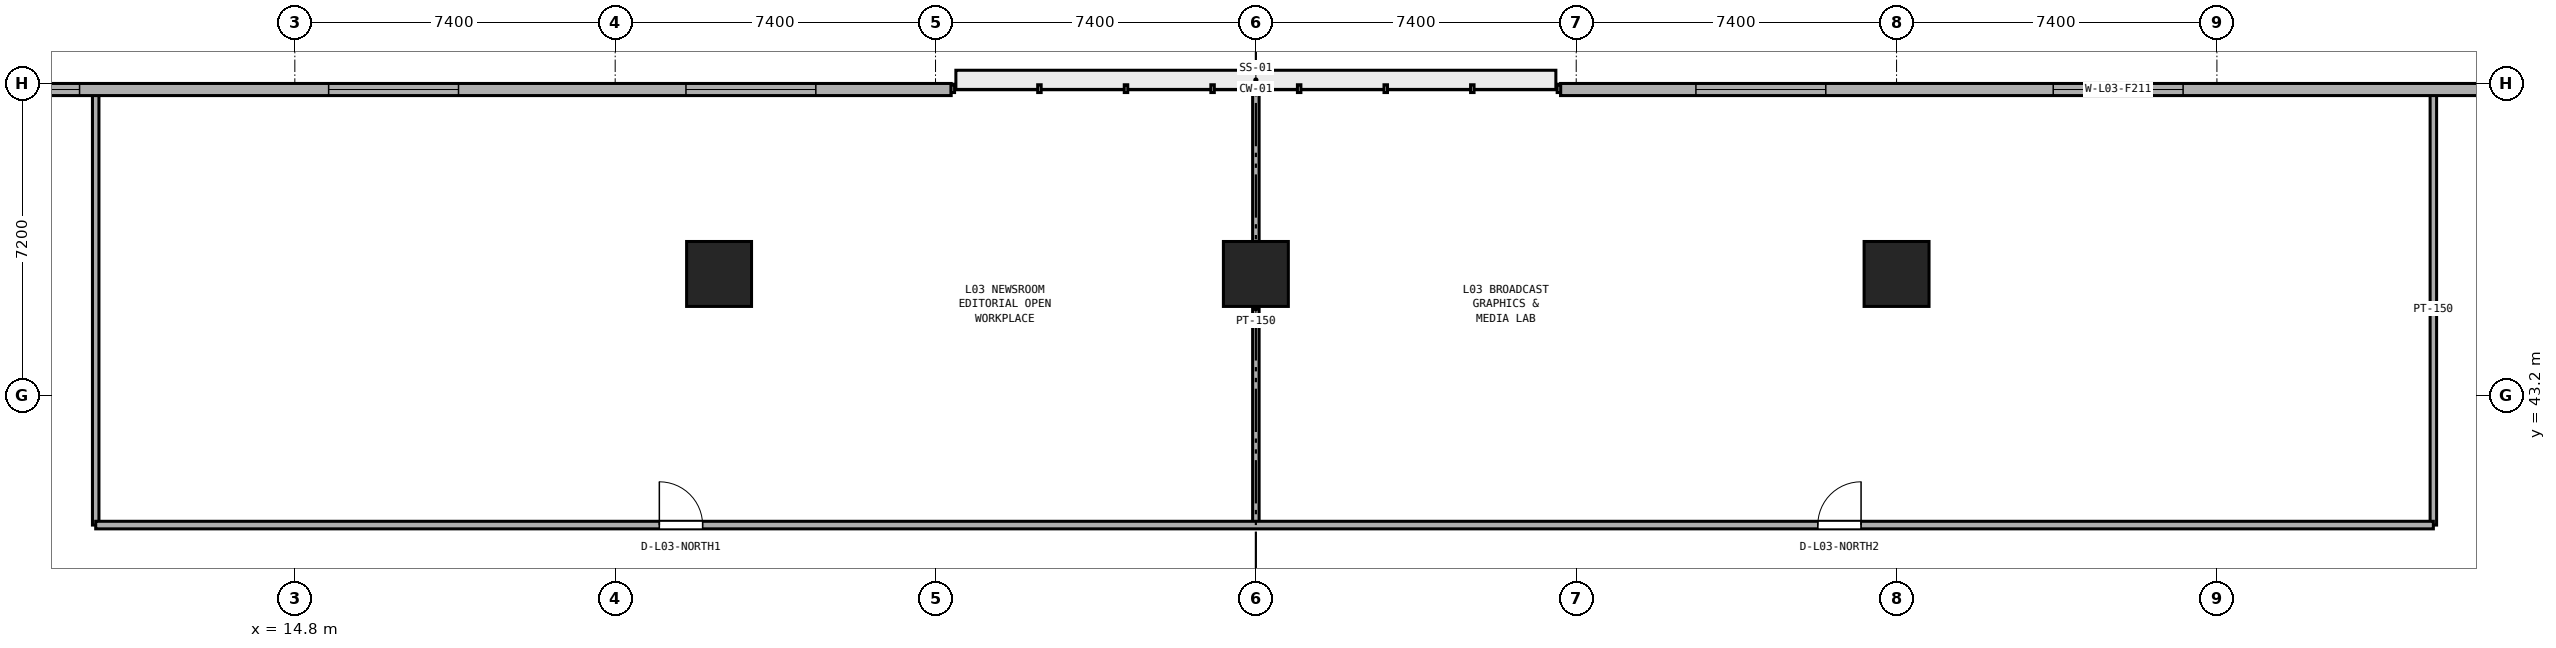
"""IFC4 building model, lengths in metres.
Left out: names, types, materials, properties, quantities, classifications, styles, units other than length and angle.
Written with IfcOpenShell. Run it as: python <this file> out.ifc"""

import sys

from ifc_helpers import new_model, si_unit, direction, frame, frame_2d, origin, origin_2d, place, context, subcontext, project, spatial, rectangle, extrude, element, fill, save


model = new_model("IFC4")
c1 = context("Model", 3, precision=1e-05, world=origin(), true_north=direction((0.0, 1.0)))
c2 = subcontext(c1, "Body", "Model", "MODEL_VIEW")
j1 = project(units=[si_unit("LENGTHUNIT", "METRE"), si_unit("PLANEANGLEUNIT", "RADIAN")], contexts=[c1])
p1 = place(None, origin())
s1 = spatial("IfcSite", under=j1, at=p1, CompositionType="ELEMENT")
p2 = place(p1, origin())
s2 = spatial("IfcBuilding", under=s1, at=p2, CompositionType="ELEMENT")
p3 = place(p2, frame((0.0, 0.0, 15.0)))
s3 = spatial("IfcBuildingStorey", under=s2, at=p3, CompositionType="ELEMENT", Elevation=15.0)
for number, where, z_axis, x_axis in (
    (1, (24.6, 46.0, 0.0), (0.0, 0.0, 1.0), (1.0, 0.0, 0.0)),
    (2, (37.0, 46.0, 0.0), (0.0, 0.0, 1.0), (1.0, 0.0, 0.0)),
    (3, (51.8, 46.0, 0.0), (0.0, 0.0, 1.0), (1.0, 0.0, 0.0)),
):
    element("IfcColumn", number, at=place(p3, frame(where, z_axis=z_axis, x_axis=x_axis)), inside=s3, PredefinedType="COLUMN", context=c2, shape_type="SweptSolid", body=[
        extrude(rectangle(XDim=1.5, YDim=1.5, at=origin_2d()), origin(), (0.0, 0.0, 1.0), 5.0),
    ])
p4 = place(p3, frame((64.2, 40.2, 0.0), z_axis=(0.0, 0.0, 1.0), x_axis=(0.0, 1.0, 0.0)))
e4 = element("IfcWall", 4, at=p4, inside=s3, PredefinedType="PARTITIONING", context=c2, shape_type="SweptSolid", body=[
    extrude(rectangle(XDim=9.995, YDim=0.15, at=frame_2d((4.998, 0.0))), origin(), (0.0, 0.0, 1.0), 4.68),
])
p5 = place(p3, frame((37.0, 40.2, 0.0), z_axis=(0.0, 0.0, 1.0), x_axis=(0.0, 1.0, 0.0)))
e5 = element("IfcWall", 5, at=p5, inside=s3, PredefinedType="PARTITIONING", context=c2, shape_type="SweptSolid", body=[
    extrude(rectangle(XDim=9.995, YDim=0.15, at=frame_2d((4.998, 0.0))), origin(), (0.0, 0.0, 1.0), 3.91),
])
p6 = place(p3, frame((10.2, 40.2, 0.0), z_axis=(0.0, 0.0, 1.0), x_axis=(0.0, 1.0, 0.0)))
e6 = element("IfcWall", 6, at=p6, inside=s3, PredefinedType="PARTITIONING", context=c2, shape_type="SweptSolid", body=[
    extrude(rectangle(XDim=9.995, YDim=0.15, at=frame_2d((4.998, 0.0))), origin(), (0.0, 0.0, 1.0), 4.68),
])
p7 = place(p3, frame((10.2, 40.2, 0.0), z_axis=(0.0, 0.0, 1.0), x_axis=(1.0, 0.0, 0.0)))
e7 = element("IfcWall", 7, at=p7, inside=s3, PredefinedType="PARTITIONING", context=c2, shape_type="SweptSolid", body=[
    extrude(rectangle(XDim=54.0, YDim=0.175, at=frame_2d((27.0, 0.0))), origin(), (0.0, 0.0, 1.0), 4.68),
])
p8 = place(p7, frame((13.02, 0.0, 0.0)))
e8 = element("IfcOpeningElement", 8, at=p8, cuts=e7, PredefinedType="OPENING", context=c2, shape_type="SweptSolid", body=[
    extrude(rectangle(XDim=1.0, YDim=2.12, at=frame_2d((0.5, 1.06))), frame((0.0, 0.097, 0.0), z_axis=(0.0, -1.0, 0.0), x_axis=(1.0, 0.0, 0.0)), (0.0, 0.0, 1.0), 0.195),
])
p9 = place(p7, frame((39.78, 0.0, 0.0)))
e9 = element("IfcOpeningElement", 9, at=p9, cuts=e7, PredefinedType="OPENING", context=c2, shape_type="SweptSolid", body=[
    extrude(rectangle(XDim=1.0, YDim=2.12, at=frame_2d((0.5, 1.06))), frame((0.0, 0.097, 0.0), z_axis=(0.0, -1.0, 0.0), x_axis=(1.0, 0.0, 0.0)), (0.0, 0.0, 1.0), 0.195),
])
p10 = place(p3, frame((69.8, 50.26, 0.0), z_axis=(0.0, 0.0, 1.0), x_axis=(-1.0, 0.0, 0.0)))
e10 = element("IfcWall", 10, at=p10, inside=s3, PredefinedType="STANDARD", context=c2, shape_type="SweptSolid", body=[
    extrude(rectangle(XDim=25.762, YDim=0.28, at=frame_2d((12.881, 0.0))), origin(), (0.0, 0.0, 1.0), 4.68),
])
p11 = place(p10, frame((11.381, 0.0, 0.9)))
e11 = element("IfcOpeningElement", 11, at=p11, cuts=e10, PredefinedType="OPENING", context=c2, shape_type="SweptSolid", body=[
    extrude(rectangle(XDim=3.0, YDim=2.2, at=frame_2d((1.5, 1.1))), frame((0.0, 0.15, 0.0), z_axis=(0.0, -1.0, 0.0), x_axis=(1.0, 0.0, 0.0)), (0.0, 0.0, 1.0), 0.3),
])
p12 = place(p10, frame((19.635, 0.0, 0.9)))
e12 = element("IfcOpeningElement", 12, at=p12, cuts=e10, PredefinedType="OPENING", context=c2, shape_type="SweptSolid", body=[
    extrude(rectangle(XDim=3.0, YDim=2.2, at=frame_2d((1.5, 1.1))), frame((0.0, 0.15, 0.0), z_axis=(0.0, -1.0, 0.0), x_axis=(1.0, 0.0, 0.0)), (0.0, 0.0, 1.0), 0.3),
])
p13 = place(p3, frame((29.962, 50.26, 0.0), z_axis=(0.0, 0.0, 1.0), x_axis=(-1.0, 0.0, 0.0)))
e13 = element("IfcWall", 13, at=p13, inside=s3, PredefinedType="STANDARD", context=c2, shape_type="SweptSolid", body=[
    extrude(rectangle(XDim=25.762, YDim=0.28, at=frame_2d((12.881, 0.0))), origin(), (0.0, 0.0, 1.0), 4.68),
])
p14 = place(p13, frame((3.127, 0.0, 0.9)))
e14 = element("IfcOpeningElement", 14, at=p14, cuts=e13, PredefinedType="OPENING", context=c2, shape_type="SweptSolid", body=[
    extrude(rectangle(XDim=3.0, YDim=2.2, at=frame_2d((1.5, 1.1))), frame((0.0, 0.15, 0.0), z_axis=(0.0, -1.0, 0.0), x_axis=(1.0, 0.0, 0.0)), (0.0, 0.0, 1.0), 0.3),
])
p15 = place(p13, frame((11.381, 0.0, 0.9)))
e15 = element("IfcOpeningElement", 15, at=p15, cuts=e13, PredefinedType="OPENING", context=c2, shape_type="SweptSolid", body=[
    extrude(rectangle(XDim=3.0, YDim=2.2, at=frame_2d((1.5, 1.1))), frame((0.0, 0.15, 0.0), z_axis=(0.0, -1.0, 0.0), x_axis=(1.0, 0.0, 0.0)), (0.0, 0.0, 1.0), 0.3),
])
p16 = place(p13, frame((20.135, 0.0, 0.9)))
e16 = element("IfcOpeningElement", 16, at=p16, cuts=e13, PredefinedType="OPENING", context=c2, shape_type="SweptSolid", body=[
    extrude(rectangle(XDim=3.0, YDim=2.2, at=frame_2d((1.5, 1.1))), frame((0.0, 0.15, 0.0), z_axis=(0.0, -1.0, 0.0), x_axis=(1.0, 0.0, 0.0)), (0.0, 0.0, 1.0), 0.3),
])
p17 = place(p8, origin())
e17 = element("IfcDoor", 17, at=p17, inside=s3, OperationType="SINGLE_SWING_LEFT", PredefinedType="DOOR", context=c2, shape_type="SweptSolid", body=[
    extrude(rectangle(XDim=1.0, YDim=2.12, at=frame_2d((0.5, 1.06))), frame((0.0, 0.025, 0.0), z_axis=(0.0, -1.0, 0.0), x_axis=(1.0, 0.0, 0.0)), (0.0, 0.0, 1.0), 0.05),
])
fill(e8, e17)
p18 = place(p9, origin())
e18 = element("IfcDoor", 18, at=p18, inside=s3, OperationType="SINGLE_SWING_RIGHT", PredefinedType="DOOR", context=c2, shape_type="SweptSolid", body=[
    extrude(rectangle(XDim=1.0, YDim=2.12, at=frame_2d((0.5, 1.06))), frame((0.0, 0.025, 0.0), z_axis=(0.0, -1.0, 0.0), x_axis=(1.0, 0.0, 0.0)), (0.0, 0.0, 1.0), 0.05),
])
fill(e9, e18)
p19 = place(p11, origin())
e19 = element("IfcWindow", 19, at=p19, inside=s3, PartitioningType="SINGLE_PANEL", PredefinedType="WINDOW", context=c2, shape_type="SweptSolid", body=[
    extrude(rectangle(XDim=3.0, YDim=2.2, at=frame_2d((1.5, 1.1))), frame((0.0, 0.03, 0.0), z_axis=(0.0, -1.0, 0.0), x_axis=(1.0, 0.0, 0.0)), (0.0, 0.0, 1.0), 0.06),
])
fill(e11, e19)
p20 = place(p12, origin())
e20 = element("IfcWindow", 20, at=p20, inside=s3, PartitioningType="SINGLE_PANEL", PredefinedType="WINDOW", context=c2, shape_type="SweptSolid", body=[
    extrude(rectangle(XDim=3.0, YDim=2.2, at=frame_2d((1.5, 1.1))), frame((0.0, 0.03, 0.0), z_axis=(0.0, -1.0, 0.0), x_axis=(1.0, 0.0, 0.0)), (0.0, 0.0, 1.0), 0.06),
])
fill(e12, e20)
p21 = place(p14, origin())
e21 = element("IfcWindow", 21, at=p21, inside=s3, PartitioningType="SINGLE_PANEL", PredefinedType="WINDOW", context=c2, shape_type="SweptSolid", body=[
    extrude(rectangle(XDim=3.0, YDim=2.2, at=frame_2d((1.5, 1.1))), frame((0.0, 0.03, 0.0), z_axis=(0.0, -1.0, 0.0), x_axis=(1.0, 0.0, 0.0)), (0.0, 0.0, 1.0), 0.06),
])
fill(e14, e21)
p22 = place(p15, origin())
e22 = element("IfcWindow", 22, at=p22, inside=s3, PartitioningType="SINGLE_PANEL", PredefinedType="WINDOW", context=c2, shape_type="SweptSolid", body=[
    extrude(rectangle(XDim=3.0, YDim=2.2, at=frame_2d((1.5, 1.1))), frame((0.0, 0.03, 0.0), z_axis=(0.0, -1.0, 0.0), x_axis=(1.0, 0.0, 0.0)), (0.0, 0.0, 1.0), 0.06),
])
fill(e15, e22)
p23 = place(p16, origin())
e23 = element("IfcWindow", 23, at=p23, inside=s3, PartitioningType="SINGLE_PANEL", PredefinedType="WINDOW", context=c2, shape_type="SweptSolid", body=[
    extrude(rectangle(XDim=3.0, YDim=2.2, at=frame_2d((1.5, 1.1))), frame((0.0, 0.03, 0.0), z_axis=(0.0, -1.0, 0.0), x_axis=(1.0, 0.0, 0.0)), (0.0, 0.0, 1.0), 0.06),
])
fill(e16, e23)
save(model, sys.argv[1])
